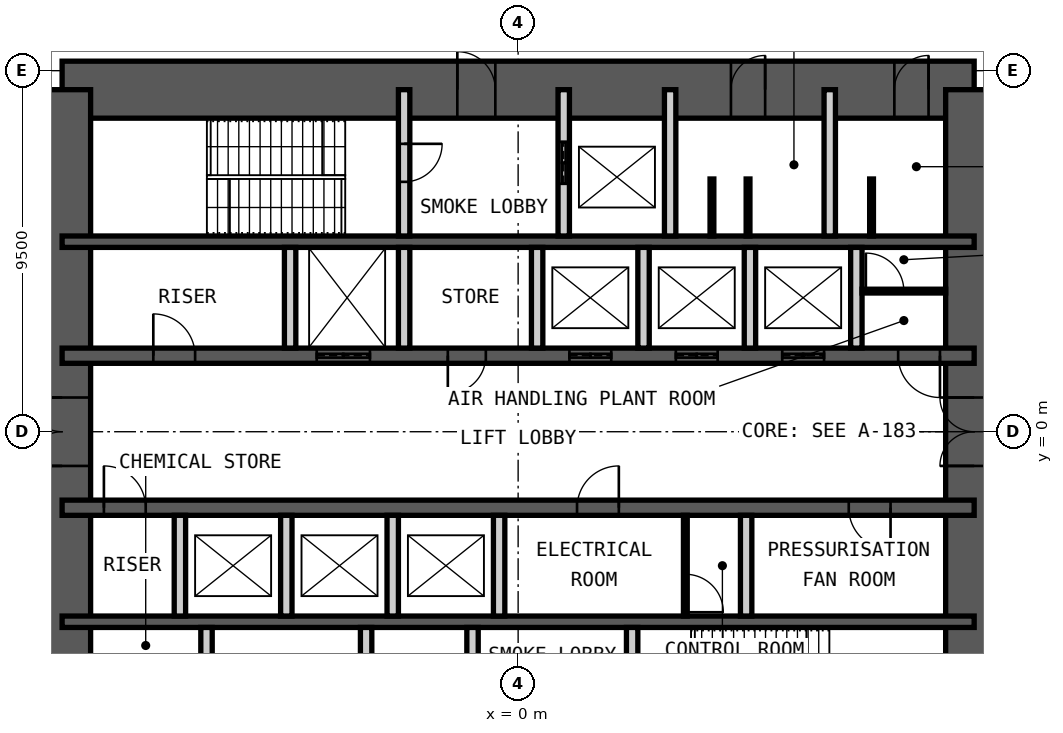
"""IFC4 building model, lengths in metres.
Left out: names, types, materials, properties, quantities, classifications, styles, units other than length and angle.
Written with IfcOpenShell. Run it as: python <this file> out.ifc"""

import sys

from ifc_helpers import new_model, si_unit, direction, frame, frame_2d, origin, place, context, subcontext, project, spatial, rectangle, extrude, element, fill, save


model = new_model("IFC4")
c1 = context("Model", 3, precision=1e-05, world=origin(), true_north=direction((0.0, 1.0)))
c2 = subcontext(c1, "Body", "Model", "MODEL_VIEW")
j1 = project(units=[si_unit("LENGTHUNIT", "METRE"), si_unit("PLANEANGLEUNIT", "RADIAN")], contexts=[c1])
p1 = place(None, origin())
s1 = spatial("IfcSite", under=j1, at=p1, CompositionType="ELEMENT")
p2 = place(p1, origin())
s2 = spatial("IfcBuilding", under=s1, at=p2, CompositionType="ELEMENT")
p3 = place(p2, frame((0.0, 0.0, 52.0)))
s3 = spatial("IfcBuildingStorey", under=s2, at=p3, CompositionType="ELEMENT", Elevation=52.0)
p4 = place(p3, frame((-12.0, 9.0, 0.0), z_axis=(0.0, 0.0, 1.0), x_axis=(1.0, 0.0, 0.0)))
e1 = element("IfcWall", 1, at=p4, inside=s3, PredefinedType="SHEAR", context=c2, shape_type="SweptSolid", body=[
    extrude(rectangle(XDim=24.0, YDim=1.5, at=frame_2d((12.0, 0.0))), origin(), (0.0, 0.0, 1.0), 5.0),
])
p5 = place(p4, frame((10.4, 0.0, 0.0)))
e2 = element("IfcOpeningElement", 2, at=p5, cuts=e1, PredefinedType="OPENING", context=c2, shape_type="SweptSolid", body=[
    extrude(rectangle(XDim=1.0, YDim=2.1, at=frame_2d((0.5, 1.05))), frame((0.0, 0.76, 0.0), z_axis=(0.0, -1.0, 0.0), x_axis=(1.0, 0.0, 0.0)), (0.0, 0.0, 1.0), 1.52),
])
p6 = place(p4, frame((17.6, 0.0, 0.0)))
e3 = element("IfcOpeningElement", 3, at=p6, cuts=e1, PredefinedType="OPENING", context=c2, shape_type="SweptSolid", body=[
    extrude(rectangle(XDim=0.9, YDim=2.1, at=frame_2d((0.45, 1.05))), frame((0.0, 0.76, 0.0), z_axis=(0.0, -1.0, 0.0), x_axis=(1.0, 0.0, 0.0)), (0.0, 0.0, 1.0), 1.52),
])
p7 = place(p4, frame((21.9, 0.0, 0.0)))
e4 = element("IfcOpeningElement", 4, at=p7, cuts=e1, PredefinedType="OPENING", context=c2, shape_type="SweptSolid", body=[
    extrude(rectangle(XDim=0.9, YDim=2.1, at=frame_2d((0.45, 1.05))), frame((0.0, 0.76, 0.0), z_axis=(0.0, -1.0, 0.0), x_axis=(1.0, 0.0, 0.0)), (0.0, 0.0, 1.0), 1.52),
])
p8 = place(p3, frame((12.0, -9.0, 0.0), z_axis=(0.0, 0.0, 1.0), x_axis=(0.0, 1.0, 0.0)))
e5 = element("IfcWall", 5, at=p8, inside=s3, PredefinedType="SHEAR", context=c2, shape_type="SweptSolid", body=[
    extrude(rectangle(XDim=18.0, YDim=1.5, at=frame_2d((9.0, 0.0))), origin(), (0.0, 0.0, 1.0), 5.0),
])
p9 = place(p8, frame((8.1, 0.0, 0.0)))
e6 = element("IfcOpeningElement", 6, at=p9, cuts=e5, PredefinedType="OPENING", context=c2, shape_type="SweptSolid", body=[
    extrude(rectangle(XDim=1.8, YDim=2.1, at=frame_2d((0.9, 1.05))), frame((0.0, 0.76, 0.0), z_axis=(0.0, -1.0, 0.0), x_axis=(1.0, 0.0, 0.0)), (0.0, 0.0, 1.0), 1.52),
])
p10 = place(p3, frame((-12.0, -9.0, 0.0), z_axis=(0.0, 0.0, 1.0), x_axis=(0.0, 1.0, 0.0)))
e7 = element("IfcWall", 7, at=p10, inside=s3, PredefinedType="SHEAR", context=c2, shape_type="SweptSolid", body=[
    extrude(rectangle(XDim=18.0, YDim=1.5, at=frame_2d((9.0, 0.0))), origin(), (0.0, 0.0, 1.0), 5.0),
])
p11 = place(p10, frame((8.1, 0.0, 0.0)))
e8 = element("IfcOpeningElement", 8, at=p11, cuts=e7, PredefinedType="OPENING", context=c2, shape_type="SweptSolid", body=[
    extrude(rectangle(XDim=1.8, YDim=2.1, at=frame_2d((0.9, 1.05))), frame((0.0, 0.76, 0.0), z_axis=(0.0, -1.0, 0.0), x_axis=(1.0, 0.0, 0.0)), (0.0, 0.0, 1.0), 1.52),
])
p12 = place(p3, frame((-12.0, 5.0, 0.0), z_axis=(0.0, 0.0, 1.0), x_axis=(1.0, 0.0, 0.0)))
e9 = element("IfcWall", 9, at=p12, inside=s3, PredefinedType="SHEAR", context=c2, shape_type="SweptSolid", body=[
    extrude(rectangle(XDim=24.0, YDim=0.3, at=frame_2d((12.0, 0.0))), origin(), (0.0, 0.0, 1.0), 5.0),
])
p13 = place(p3, frame((-12.0, 2.0, 0.0), z_axis=(0.0, 0.0, 1.0), x_axis=(1.0, 0.0, 0.0)))
e10 = element("IfcWall", 10, at=p13, inside=s3, PredefinedType="SHEAR", context=c2, shape_type="SweptSolid", body=[
    extrude(rectangle(XDim=24.0, YDim=0.4, at=frame_2d((12.0, 0.0))), origin(), (0.0, 0.0, 1.0), 5.0),
])
p14 = place(p13, frame((2.4, 0.0, 0.0)))
e11 = element("IfcOpeningElement", 11, at=p14, cuts=e10, PredefinedType="OPENING", context=c2, shape_type="SweptSolid", body=[
    extrude(rectangle(XDim=1.1, YDim=2.1, at=frame_2d((0.55, 1.05))), frame((0.0, 0.21, 0.0), z_axis=(0.0, -1.0, 0.0), x_axis=(1.0, 0.0, 0.0)), (0.0, 0.0, 1.0), 0.42),
])
p15 = place(p13, frame((22.0, 0.0, 0.0)))
e12 = element("IfcOpeningElement", 12, at=p15, cuts=e10, PredefinedType="OPENING", context=c2, shape_type="SweptSolid", body=[
    extrude(rectangle(XDim=1.1, YDim=2.1, at=frame_2d((0.55, 1.05))), frame((0.0, 0.21, 0.0), z_axis=(0.0, -1.0, 0.0), x_axis=(1.0, 0.0, 0.0)), (0.0, 0.0, 1.0), 0.42),
])
p16 = place(p13, frame((10.15, 0.0, 0.0)))
e13 = element("IfcOpeningElement", 13, at=p16, cuts=e10, PredefinedType="OPENING", context=c2, shape_type="SweptSolid", body=[
    extrude(rectangle(XDim=1.0, YDim=2.1, at=frame_2d((0.5, 1.05))), frame((0.0, 0.21, 0.0), z_axis=(0.0, -1.0, 0.0), x_axis=(1.0, 0.0, 0.0)), (0.0, 0.0, 1.0), 0.42),
])
p17 = place(p13, frame((6.7, 0.0, 0.0)))
e14 = element("IfcOpeningElement", 14, at=p17, cuts=e10, PredefinedType="OPENING", context=c2, shape_type="SweptSolid", body=[
    extrude(rectangle(XDim=1.4, YDim=2.4, at=frame_2d((0.7, 1.2))), frame((0.0, 0.21, 0.0), z_axis=(0.0, -1.0, 0.0), x_axis=(1.0, 0.0, 0.0)), (0.0, 0.0, 1.0), 0.42),
])
p18 = place(p13, frame((13.35, 0.0, 0.0)))
e15 = element("IfcOpeningElement", 15, at=p18, cuts=e10, PredefinedType="OPENING", context=c2, shape_type="SweptSolid", body=[
    extrude(rectangle(XDim=1.1, YDim=2.4, at=frame_2d((0.55, 1.2))), frame((0.0, 0.21, 0.0), z_axis=(0.0, -1.0, 0.0), x_axis=(1.0, 0.0, 0.0)), (0.0, 0.0, 1.0), 0.42),
])
p19 = place(p13, frame((16.15, 0.0, 0.0)))
e16 = element("IfcOpeningElement", 16, at=p19, cuts=e10, PredefinedType="OPENING", context=c2, shape_type="SweptSolid", body=[
    extrude(rectangle(XDim=1.1, YDim=2.4, at=frame_2d((0.55, 1.2))), frame((0.0, 0.21, 0.0), z_axis=(0.0, -1.0, 0.0), x_axis=(1.0, 0.0, 0.0)), (0.0, 0.0, 1.0), 0.42),
])
p20 = place(p13, frame((18.95, 0.0, 0.0)))
e17 = element("IfcOpeningElement", 17, at=p20, cuts=e10, PredefinedType="OPENING", context=c2, shape_type="SweptSolid", body=[
    extrude(rectangle(XDim=1.1, YDim=2.4, at=frame_2d((0.55, 1.2))), frame((0.0, 0.21, 0.0), z_axis=(0.0, -1.0, 0.0), x_axis=(1.0, 0.0, 0.0)), (0.0, 0.0, 1.0), 0.42),
])
p21 = place(p3, frame((-12.0, -2.0, 0.0), z_axis=(0.0, 0.0, 1.0), x_axis=(1.0, 0.0, 0.0)))
e18 = element("IfcWall", 18, at=p21, inside=s3, PredefinedType="SHEAR", context=c2, shape_type="SweptSolid", body=[
    extrude(rectangle(XDim=24.0, YDim=0.4, at=frame_2d((12.0, 0.0))), origin(), (0.0, 0.0, 1.0), 5.0),
])
p22 = place(p21, frame((1.1, 0.0, 0.0)))
e19 = element("IfcOpeningElement", 19, at=p22, cuts=e18, PredefinedType="OPENING", context=c2, shape_type="SweptSolid", body=[
    extrude(rectangle(XDim=1.1, YDim=2.1, at=frame_2d((0.55, 1.05))), frame((0.0, 0.21, 0.0), z_axis=(0.0, -1.0, 0.0), x_axis=(1.0, 0.0, 0.0)), (0.0, 0.0, 1.0), 0.42),
])
p23 = place(p21, frame((13.55, 0.0, 0.0)))
e20 = element("IfcOpeningElement", 20, at=p23, cuts=e18, PredefinedType="OPENING", context=c2, shape_type="SweptSolid", body=[
    extrude(rectangle(XDim=1.1, YDim=2.1, at=frame_2d((0.55, 1.05))), frame((0.0, 0.21, 0.0), z_axis=(0.0, -1.0, 0.0), x_axis=(1.0, 0.0, 0.0)), (0.0, 0.0, 1.0), 0.42),
])
p24 = place(p21, frame((20.7, 0.0, 0.0)))
e21 = element("IfcOpeningElement", 21, at=p24, cuts=e18, PredefinedType="OPENING", context=c2, shape_type="SweptSolid", body=[
    extrude(rectangle(XDim=1.1, YDim=2.1, at=frame_2d((0.55, 1.05))), frame((0.0, 0.21, 0.0), z_axis=(0.0, -1.0, 0.0), x_axis=(1.0, 0.0, 0.0)), (0.0, 0.0, 1.0), 0.42),
])
p25 = place(p3, frame((-12.0, -5.0, 0.0), z_axis=(0.0, 0.0, 1.0), x_axis=(1.0, 0.0, 0.0)))
e22 = element("IfcWall", 22, at=p25, inside=s3, PredefinedType="SHEAR", context=c2, shape_type="SweptSolid", body=[
    extrude(rectangle(XDim=24.0, YDim=0.3, at=frame_2d((12.0, 0.0))), origin(), (0.0, 0.0, 1.0), 5.0),
])
p26 = place(p3, frame((-3.0, 5.15, 0.0), z_axis=(0.0, 0.0, 1.0), x_axis=(0.0, 1.0, 0.0)))
e23 = element("IfcWall", 23, at=p26, inside=s3, PredefinedType="PARTITIONING", context=c2, shape_type="SweptSolid", body=[
    extrude(rectangle(XDim=3.85, YDim=0.3, at=frame_2d((1.925, 0.0))), origin(), (0.0, 0.0, 1.0), 4.78),
])
p27 = place(p26, frame((1.425, 0.0, 0.0)))
e24 = element("IfcOpeningElement", 24, at=p27, cuts=e23, PredefinedType="OPENING", context=c2, shape_type="SweptSolid", body=[
    extrude(rectangle(XDim=1.0, YDim=2.1, at=frame_2d((0.5, 1.05))), frame((0.0, 0.16, 0.0), z_axis=(0.0, -1.0, 0.0), x_axis=(1.0, 0.0, 0.0)), (0.0, 0.0, 1.0), 0.32),
])
p28 = place(p3, frame((1.2, 5.15, 0.0), z_axis=(0.0, 0.0, 1.0), x_axis=(0.0, 1.0, 0.0)))
e25 = element("IfcWall", 25, at=p28, inside=s3, PredefinedType="PARTITIONING", context=c2, shape_type="SweptSolid", body=[
    extrude(rectangle(XDim=3.85, YDim=0.3, at=frame_2d((1.925, 0.0))), origin(), (0.0, 0.0, 1.0), 4.78),
])
p29 = place(p28, frame((1.375, 0.0, 0.0)))
e26 = element("IfcOpeningElement", 26, at=p29, cuts=e25, PredefinedType="OPENING", context=c2, shape_type="SweptSolid", body=[
    extrude(rectangle(XDim=1.1, YDim=2.4, at=frame_2d((0.55, 1.2))), frame((0.0, 0.16, 0.0), z_axis=(0.0, -1.0, 0.0), x_axis=(1.0, 0.0, 0.0)), (0.0, 0.0, 1.0), 0.32),
])
for number, where, z_axis, x_axis in (
    (27, (4.0, 5.15, 0.0), (0.0, 0.0, 1.0), (0.0, 1.0, 0.0)),
    (28, (8.2, 5.15, 0.0), (0.0, 0.0, 1.0), (0.0, 1.0, 0.0)),
):
    element("IfcWall", number, at=place(p3, frame(where, z_axis=z_axis, x_axis=x_axis)), inside=s3, PredefinedType="PARTITIONING", context=c2, shape_type="SweptSolid", body=[
        extrude(rectangle(XDim=3.85, YDim=0.3, at=frame_2d((1.925, 0.0))), origin(), (0.0, 0.0, 1.0), 4.78),
    ])
for number, where, z_axis, x_axis in (
    (29, (-6.0, 2.2, 0.0), (0.0, 0.0, 1.0), (0.0, 1.0, 0.0)),
    (30, (-3.0, 2.2, 0.0), (0.0, 0.0, 1.0), (0.0, 1.0, 0.0)),
    (31, (0.5, 2.2, 0.0), (0.0, 0.0, 1.0), (0.0, 1.0, 0.0)),
    (32, (3.3, 2.2, 0.0), (0.0, 0.0, 1.0), (0.0, 1.0, 0.0)),
    (33, (6.1, 2.2, 0.0), (0.0, 0.0, 1.0), (0.0, 1.0, 0.0)),
    (34, (8.9, 2.2, 0.0), (0.0, 0.0, 1.0), (0.0, 1.0, 0.0)),
    (35, (-8.9, -4.85, 0.0), (0.0, 0.0, 1.0), (0.0, 1.0, 0.0)),
    (36, (-6.1, -4.85, 0.0), (0.0, 0.0, 1.0), (0.0, 1.0, 0.0)),
    (37, (-3.3, -4.85, 0.0), (0.0, 0.0, 1.0), (0.0, 1.0, 0.0)),
    (38, (-0.5, -4.85, 0.0), (0.0, 0.0, 1.0), (0.0, 1.0, 0.0)),
    (39, (6.0, -4.85, 0.0), (0.0, 0.0, 1.0), (0.0, 1.0, 0.0)),
):
    element("IfcWall", number, at=place(p3, frame(where, z_axis=z_axis, x_axis=x_axis)), inside=s3, PredefinedType="PARTITIONING", context=c2, shape_type="SweptSolid", body=[
        extrude(rectangle(XDim=2.65, YDim=0.3, at=frame_2d((1.325, 0.0))), origin(), (0.0, 0.0, 1.0), 4.78),
    ])
for number, where, z_axis, x_axis in (
    (40, (-8.2, -9.0, 0.0), (0.0, 0.0, 1.0), (0.0, 1.0, 0.0)),
    (41, (-4.0, -9.0, 0.0), (0.0, 0.0, 1.0), (0.0, 1.0, 0.0)),
):
    element("IfcWall", number, at=place(p3, frame(where, z_axis=z_axis, x_axis=x_axis)), inside=s3, PredefinedType="PARTITIONING", context=c2, shape_type="SweptSolid", body=[
        extrude(rectangle(XDim=3.85, YDim=0.3, at=frame_2d((1.925, 0.0))), origin(), (0.0, 0.0, 1.0), 4.78),
    ])
p30 = place(p3, frame((-1.2, -9.0, 0.0), z_axis=(0.0, 0.0, 1.0), x_axis=(0.0, 1.0, 0.0)))
e42 = element("IfcWall", 42, at=p30, inside=s3, PredefinedType="PARTITIONING", context=c2, shape_type="SweptSolid", body=[
    extrude(rectangle(XDim=3.85, YDim=0.3, at=frame_2d((1.925, 0.0))), origin(), (0.0, 0.0, 1.0), 4.78),
])
p31 = place(p30, frame((1.375, 0.0, 0.0)))
e43 = element("IfcOpeningElement", 43, at=p31, cuts=e42, PredefinedType="OPENING", context=c2, shape_type="SweptSolid", body=[
    extrude(rectangle(XDim=1.1, YDim=2.4, at=frame_2d((0.55, 1.2))), frame((0.0, 0.16, 0.0), z_axis=(0.0, -1.0, 0.0), x_axis=(1.0, 0.0, 0.0)), (0.0, 0.0, 1.0), 0.32),
])
p32 = place(p3, frame((3.0, -9.0, 0.0), z_axis=(0.0, 0.0, 1.0), x_axis=(0.0, 1.0, 0.0)))
e44 = element("IfcWall", 44, at=p32, inside=s3, PredefinedType="PARTITIONING", context=c2, shape_type="SweptSolid", body=[
    extrude(rectangle(XDim=3.85, YDim=0.3, at=frame_2d((1.925, 0.0))), origin(), (0.0, 0.0, 1.0), 4.78),
])
p33 = place(p32, frame((1.425, 0.0, 0.0)))
e45 = element("IfcOpeningElement", 45, at=p33, cuts=e44, PredefinedType="OPENING", context=c2, shape_type="SweptSolid", body=[
    extrude(rectangle(XDim=1.0, YDim=2.1, at=frame_2d((0.5, 1.05))), frame((0.0, 0.16, 0.0), z_axis=(0.0, -1.0, 0.0), x_axis=(1.0, 0.0, 0.0)), (0.0, 0.0, 1.0), 0.32),
])
p34 = place(p3, frame((4.4, -4.85, 0.0), z_axis=(0.0, 0.0, 1.0), x_axis=(0.0, 1.0, 0.0)))
e46 = element("IfcWall", 46, at=p34, inside=s3, PredefinedType="PARTITIONING", context=c2, shape_type="SweptSolid", body=[
    extrude(rectangle(XDim=2.65, YDim=0.1, at=frame_2d((1.325, 0.0))), origin(), (0.0, 0.0, 1.0), 4.78),
])
p35 = place(p34, frame((0.1, 0.0, 0.0)))
e47 = element("IfcOpeningElement", 47, at=p35, cuts=e46, PredefinedType="OPENING", context=c2, shape_type="SweptSolid", body=[
    extrude(rectangle(XDim=1.0, YDim=2.4, at=frame_2d((0.5, 1.2))), frame((0.0, 0.06, 0.0), z_axis=(0.0, -1.0, 0.0), x_axis=(1.0, 0.0, 0.0)), (0.0, 0.0, 1.0), 0.12),
])
p36 = place(p3, frame((9.05, 3.7, 0.0), z_axis=(0.0, 0.0, 1.0), x_axis=(1.0, 0.0, 0.0)))
e48 = element("IfcWall", 48, at=p36, inside=s3, PredefinedType="PARTITIONING", context=c2, shape_type="SweptSolid", body=[
    extrude(rectangle(XDim=2.2, YDim=0.1, at=frame_2d((1.1, 0.0))), origin(), (0.0, 0.0, 1.0), 4.78),
])
p37 = place(p36, frame((0.1, 0.0, 0.0)))
e49 = element("IfcOpeningElement", 49, at=p37, cuts=e48, PredefinedType="OPENING", context=c2, shape_type="SweptSolid", body=[
    extrude(rectangle(XDim=1.0, YDim=2.4, at=frame_2d((0.5, 1.2))), frame((0.0, 0.06, 0.0), z_axis=(0.0, -1.0, 0.0), x_axis=(1.0, 0.0, 0.0)), (0.0, 0.0, 1.0), 0.12),
])
for number, where, z_axis, x_axis in (
    (50, (5.1, 5.15, 0.0), (0.0, 0.0, 1.0), (0.0, 1.0, 0.0)),
    (51, (6.05, 5.15, 0.0), (0.0, 0.0, 1.0), (0.0, 1.0, 0.0)),
    (52, (9.3, 5.15, 0.0), (0.0, 0.0, 1.0), (0.0, 1.0, 0.0)),
):
    element("IfcWall", number, at=place(p3, frame(where, z_axis=z_axis, x_axis=x_axis)), inside=s3, PredefinedType="PARTITIONING", context=c2, shape_type="SweptSolid", body=[
        extrude(rectangle(XDim=1.5, YDim=0.1, at=frame_2d((0.75, 0.0))), origin(), (0.0, 0.0, 1.0), 2.1),
    ])
p38 = place(p5, origin())
e53 = element("IfcDoor", 53, at=p38, inside=s3, OperationType="SINGLE_SWING_RIGHT", PredefinedType="DOOR", context=c2, shape_type="SweptSolid", body=[
    extrude(rectangle(XDim=1.0, YDim=2.1, at=frame_2d((0.5, 1.05))), frame((0.0, 0.025, 0.0), z_axis=(0.0, -1.0, 0.0), x_axis=(1.0, 0.0, 0.0)), (0.0, 0.0, 1.0), 0.05),
])
fill(e2, e53)
p39 = place(p6, origin())
e54 = element("IfcDoor", 54, at=p39, inside=s3, OperationType="SINGLE_SWING_LEFT", PredefinedType="DOOR", context=c2, shape_type="SweptSolid", body=[
    extrude(rectangle(XDim=0.9, YDim=2.1, at=frame_2d((0.45, 1.05))), frame((0.0, 0.025, 0.0), z_axis=(0.0, -1.0, 0.0), x_axis=(1.0, 0.0, 0.0)), (0.0, 0.0, 1.0), 0.05),
])
fill(e3, e54)
p40 = place(p7, origin())
e55 = element("IfcDoor", 55, at=p40, inside=s3, OperationType="SINGLE_SWING_LEFT", PredefinedType="DOOR", context=c2, shape_type="SweptSolid", body=[
    extrude(rectangle(XDim=0.9, YDim=2.1, at=frame_2d((0.45, 1.05))), frame((0.0, 0.025, 0.0), z_axis=(0.0, -1.0, 0.0), x_axis=(1.0, 0.0, 0.0)), (0.0, 0.0, 1.0), 0.05),
])
fill(e4, e55)
p41 = place(p27, origin())
e56 = element("IfcDoor", 56, at=p41, inside=s3, OperationType="SINGLE_SWING_RIGHT", PredefinedType="DOOR", context=c2, shape_type="SweptSolid", body=[
    extrude(rectangle(XDim=1.0, YDim=2.1, at=frame_2d((0.5, 1.05))), frame((0.0, 0.025, 0.0), z_axis=(0.0, -1.0, 0.0), x_axis=(1.0, 0.0, 0.0)), (0.0, 0.0, 1.0), 0.05),
])
fill(e24, e56)
p42 = place(p14, origin())
e57 = element("IfcDoor", 57, at=p42, inside=s3, OperationType="SINGLE_SWING_RIGHT", PredefinedType="DOOR", context=c2, shape_type="SweptSolid", body=[
    extrude(rectangle(XDim=1.1, YDim=2.1, at=frame_2d((0.55, 1.05))), frame((0.0, 0.025, 0.0), z_axis=(0.0, -1.0, 0.0), x_axis=(1.0, 0.0, 0.0)), (0.0, 0.0, 1.0), 0.05),
])
fill(e11, e57)
p43 = place(p22, origin())
e58 = element("IfcDoor", 58, at=p43, inside=s3, OperationType="SINGLE_SWING_RIGHT", PredefinedType="DOOR", context=c2, shape_type="SweptSolid", body=[
    extrude(rectangle(XDim=1.1, YDim=2.1, at=frame_2d((0.55, 1.05))), frame((0.0, 0.025, 0.0), z_axis=(0.0, -1.0, 0.0), x_axis=(1.0, 0.0, 0.0)), (0.0, 0.0, 1.0), 0.05),
])
fill(e19, e58)
p44 = place(p15, origin())
e59 = element("IfcDoor", 59, at=p44, inside=s3, OperationType="SINGLE_SWING_RIGHT", PredefinedType="DOOR", context=c2, shape_type="SweptSolid", body=[
    extrude(rectangle(XDim=1.1, YDim=2.1, at=frame_2d((0.55, 1.05))), frame((0.0, 0.025, 0.0), z_axis=(0.0, -1.0, 0.0), x_axis=(1.0, 0.0, 0.0)), (0.0, 0.0, 1.0), 0.05),
])
fill(e12, e59)
p45 = place(p16, origin())
e60 = element("IfcDoor", 60, at=p45, inside=s3, OperationType="SINGLE_SWING_LEFT", PredefinedType="DOOR", context=c2, shape_type="SweptSolid", body=[
    extrude(rectangle(XDim=1.0, YDim=2.1, at=frame_2d((0.5, 1.05))), frame((0.0, 0.025, 0.0), z_axis=(0.0, -1.0, 0.0), x_axis=(1.0, 0.0, 0.0)), (0.0, 0.0, 1.0), 0.05),
])
fill(e13, e60)
p46 = place(p23, origin())
e61 = element("IfcDoor", 61, at=p46, inside=s3, OperationType="SINGLE_SWING_LEFT", PredefinedType="DOOR", context=c2, shape_type="SweptSolid", body=[
    extrude(rectangle(XDim=1.1, YDim=2.1, at=frame_2d((0.55, 1.05))), frame((0.0, 0.025, 0.0), z_axis=(0.0, -1.0, 0.0), x_axis=(1.0, 0.0, 0.0)), (0.0, 0.0, 1.0), 0.05),
])
fill(e20, e61)
p47 = place(p24, origin())
e62 = element("IfcDoor", 62, at=p47, inside=s3, OperationType="SINGLE_SWING_RIGHT", PredefinedType="DOOR", context=c2, shape_type="SweptSolid", body=[
    extrude(rectangle(XDim=1.1, YDim=2.1, at=frame_2d((0.55, 1.05))), frame((0.0, 0.025, 0.0), z_axis=(0.0, -1.0, 0.0), x_axis=(1.0, 0.0, 0.0)), (0.0, 0.0, 1.0), 0.05),
])
fill(e21, e62)
p48 = place(p9, origin())
e63 = element("IfcDoor", 63, at=p48, inside=s3, OperationType="DOUBLE_DOOR_DOUBLE_SWING", PredefinedType="DOOR", context=c2, shape_type="SweptSolid", body=[
    extrude(rectangle(XDim=1.8, YDim=2.1, at=frame_2d((0.9, 1.05))), frame((0.0, 0.025, 0.0), z_axis=(0.0, -1.0, 0.0), x_axis=(1.0, 0.0, 0.0)), (0.0, 0.0, 1.0), 0.05),
])
fill(e6, e63)
p49 = place(p11, origin())
e64 = element("IfcDoor", 64, at=p49, inside=s3, OperationType="DOUBLE_DOOR_DOUBLE_SWING", PredefinedType="DOOR", context=c2, shape_type="SweptSolid", body=[
    extrude(rectangle(XDim=1.8, YDim=2.1, at=frame_2d((0.9, 1.05))), frame((0.0, 0.025, 0.0), z_axis=(0.0, -1.0, 0.0), x_axis=(1.0, 0.0, 0.0)), (0.0, 0.0, 1.0), 0.05),
])
fill(e8, e64)
p50 = place(p29, origin())
e65 = element("IfcDoor", 65, at=p50, inside=s3, OperationType="DOUBLE_DOOR_SLIDING", PredefinedType="DOOR", context=c2, shape_type="SweptSolid", body=[
    extrude(rectangle(XDim=1.1, YDim=2.4, at=frame_2d((0.55, 1.2))), frame((0.0, 0.025, 0.0), z_axis=(0.0, -1.0, 0.0), x_axis=(1.0, 0.0, 0.0)), (0.0, 0.0, 1.0), 0.05),
])
fill(e26, e65)
p51 = place(p17, origin())
e66 = element("IfcDoor", 66, at=p51, inside=s3, OperationType="DOUBLE_DOOR_SLIDING", PredefinedType="DOOR", context=c2, shape_type="SweptSolid", body=[
    extrude(rectangle(XDim=1.4, YDim=2.4, at=frame_2d((0.7, 1.2))), frame((0.0, 0.025, 0.0), z_axis=(0.0, -1.0, 0.0), x_axis=(1.0, 0.0, 0.0)), (0.0, 0.0, 1.0), 0.05),
])
fill(e14, e66)
p52 = place(p18, origin())
e67 = element("IfcDoor", 67, at=p52, inside=s3, OperationType="DOUBLE_DOOR_SLIDING", PredefinedType="DOOR", context=c2, shape_type="SweptSolid", body=[
    extrude(rectangle(XDim=1.1, YDim=2.4, at=frame_2d((0.55, 1.2))), frame((0.0, 0.025, 0.0), z_axis=(0.0, -1.0, 0.0), x_axis=(1.0, 0.0, 0.0)), (0.0, 0.0, 1.0), 0.05),
])
fill(e15, e67)
p53 = place(p19, origin())
e68 = element("IfcDoor", 68, at=p53, inside=s3, OperationType="DOUBLE_DOOR_SLIDING", PredefinedType="DOOR", context=c2, shape_type="SweptSolid", body=[
    extrude(rectangle(XDim=1.1, YDim=2.4, at=frame_2d((0.55, 1.2))), frame((0.0, 0.025, 0.0), z_axis=(0.0, -1.0, 0.0), x_axis=(1.0, 0.0, 0.0)), (0.0, 0.0, 1.0), 0.05),
])
fill(e16, e68)
p54 = place(p20, origin())
e69 = element("IfcDoor", 69, at=p54, inside=s3, OperationType="DOUBLE_DOOR_SLIDING", PredefinedType="DOOR", context=c2, shape_type="SweptSolid", body=[
    extrude(rectangle(XDim=1.1, YDim=2.4, at=frame_2d((0.55, 1.2))), frame((0.0, 0.025, 0.0), z_axis=(0.0, -1.0, 0.0), x_axis=(1.0, 0.0, 0.0)), (0.0, 0.0, 1.0), 0.05),
])
fill(e17, e69)
p55 = place(p35, origin())
e70 = element("IfcDoor", 70, at=p55, inside=s3, OperationType="SINGLE_SWING_LEFT", PredefinedType="DOOR", context=c2, shape_type="SweptSolid", body=[
    extrude(rectangle(XDim=1.0, YDim=2.4, at=frame_2d((0.5, 1.2))), frame((0.0, 0.025, 0.0), z_axis=(0.0, -1.0, 0.0), x_axis=(1.0, 0.0, 0.0)), (0.0, 0.0, 1.0), 0.05),
])
fill(e47, e70)
p56 = place(p37, origin())
e71 = element("IfcDoor", 71, at=p56, inside=s3, OperationType="SINGLE_SWING_RIGHT", PredefinedType="DOOR", context=c2, shape_type="SweptSolid", body=[
    extrude(rectangle(XDim=1.0, YDim=2.4, at=frame_2d((0.5, 1.2))), frame((0.0, 0.025, 0.0), z_axis=(0.0, -1.0, 0.0), x_axis=(1.0, 0.0, 0.0)), (0.0, 0.0, 1.0), 0.05),
])
fill(e49, e71)
save(model, sys.argv[1])
